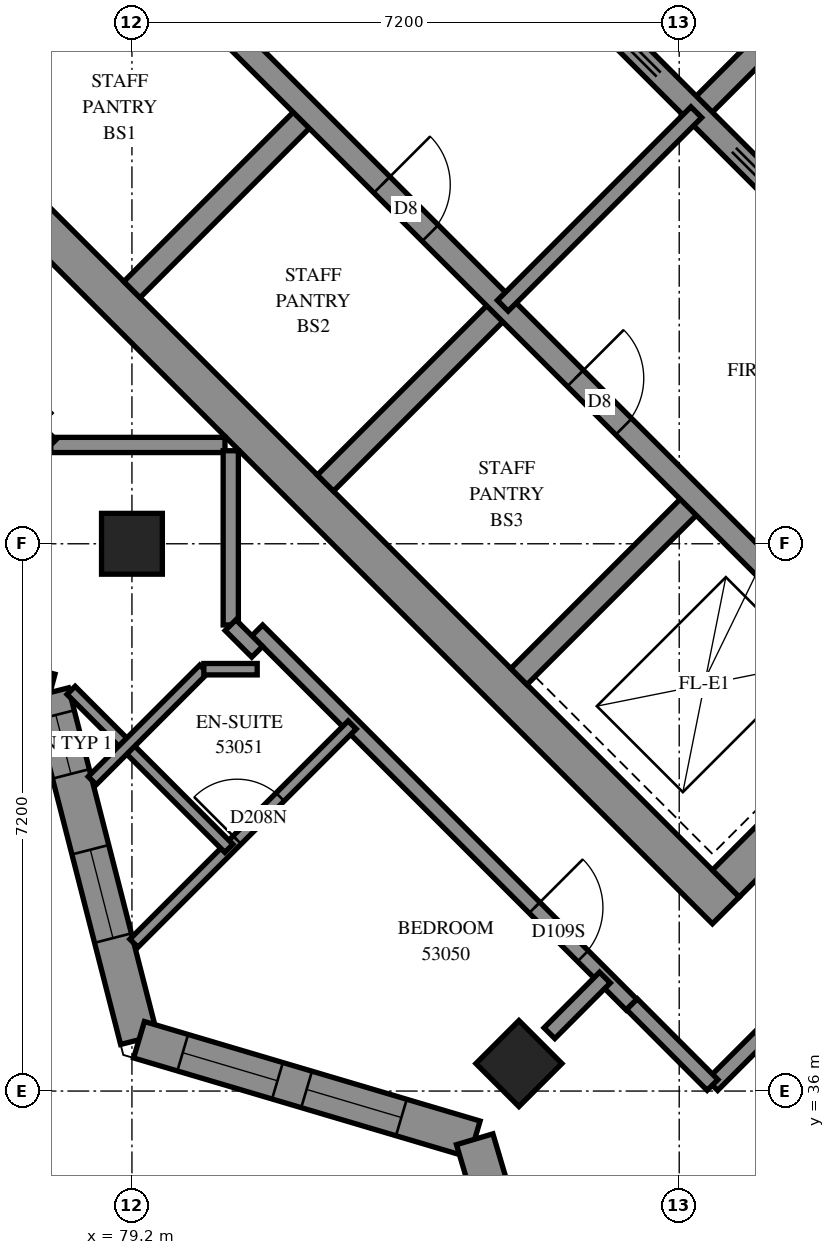
"""IFC4 building model, lengths in metres.
Left out: names, types, materials, properties, quantities, classifications, styles, units other than length and angle.
Written with IfcOpenShell. Run it as: python <this file> out.ifc"""

import sys

from ifc_helpers import new_model, si_unit, direction, frame, frame_2d, origin, origin_2d, place, context, subcontext, project, spatial, polyline, rectangle, outline, extrude, element, fill, save


model = new_model("IFC4")
c1 = context("Model", 3, precision=1e-05, world=origin(), true_north=direction((0.0, 1.0)))
c2 = subcontext(c1, "Body", "Model", "MODEL_VIEW")
j1 = project(units=[si_unit("LENGTHUNIT", "METRE"), si_unit("PLANEANGLEUNIT", "RADIAN")], contexts=[c1])
p1 = place(None, origin())
s1 = spatial("IfcSite", under=j1, at=p1, CompositionType="ELEMENT")
p2 = place(p1, origin())
s2 = spatial("IfcBuilding", under=s1, at=p2, CompositionType="ELEMENT")
p3 = place(p2, frame((0.0, 0.0, 196.4)))
s3 = spatial("IfcBuildingStorey", under=s2, at=p3, CompositionType="ELEMENT", Elevation=196.4)
for number, where, z_axis, x_axis in (
    (1, (79.2, 43.2, 0.0), (0.0, 0.0, 1.0), (1.0, 0.0, 0.0)),
    (2, (84.291, 36.362, 0.0), (0.0, 0.0, 1.0), (0.707, -0.707, 0.0)),
):
    element("IfcColumn", number, at=place(p3, frame(where, z_axis=z_axis, x_axis=x_axis)), inside=s3, PredefinedType="COLUMN", context=c2, shape_type="SweptSolid", body=[
        extrude(rectangle(XDim=0.8, YDim=0.8, at=origin_2d()), origin(), (0.0, 0.0, 1.0), 3.1),
    ])
p4 = place(p3, frame((76.124, 49.267, -0.3), z_axis=(0.0, 0.0, 1.0), x_axis=(0.7071067812, -0.7071067812, 0.0)))
e3 = element("IfcWall", 3, at=p4, inside=s3, PredefinedType="SHEAR", context=c2, shape_type="SweptSolid", body=[
    extrude(rectangle(XDim=15.4, YDim=0.5, at=frame_2d((7.7, 0.0))), origin(), (0.0, 0.0, 1.0), 2.7),
])
p5 = place(p3, frame((86.66, 59.802, -0.3), z_axis=(0.0, 0.0, 1.0), x_axis=(0.7071067812, -0.7071067812, 0.0)))
e4 = element("IfcWall", 4, at=p5, inside=s3, PredefinedType="SHEAR", context=c2, shape_type="SweptSolid", body=[
    extrude(rectangle(XDim=15.4, YDim=0.5, at=frame_2d((7.7, 0.0))), origin(), (0.0, 0.0, 1.0), 2.7),
])
p6 = place(p5, frame((10.5, 0.0, 0.3)))
e5 = element("IfcOpeningElement", 5, at=p6, cuts=e4, PredefinedType="OPENING", context=c2, shape_type="SweptSolid", body=[
    extrude(rectangle(XDim=0.8, YDim=2.1, at=frame_2d((0.4, 1.05))), frame((0.0, 0.26, 0.0), z_axis=(0.0, -1.0, 0.0), x_axis=(1.0, 0.0, 0.0)), (0.0, 0.0, 1.0), 0.52),
])
p7 = place(p3, frame((76.478, 49.267, -0.3), z_axis=(0.0, 0.0, 1.0), x_axis=(0.7071067812, 0.7071067812, 0.0)))
e6 = element("IfcWall", 6, at=p7, inside=s3, PredefinedType="SHEAR", context=c2, shape_type="SweptSolid", body=[
    extrude(rectangle(XDim=14.4, YDim=0.5, at=frame_2d((7.2, 0.0))), origin(), (0.0, 0.0, 1.0), 2.7),
])
p8 = place(p7, frame((4.55, 0.0, 0.3)))
e7 = element("IfcOpeningElement", 7, at=p8, cuts=e6, PredefinedType="OPENING", context=c2, shape_type="SweptSolid", body=[
    extrude(rectangle(XDim=1.1, YDim=2.1, at=frame_2d((0.55, 1.05))), frame((0.0, 0.26, 0.0), z_axis=(0.0, -1.0, 0.0), x_axis=(1.0, 0.0, 0.0)), (0.0, 0.0, 1.0), 0.52),
])
p9 = place(p7, frame((11.35, 0.0, 0.3)))
e8 = element("IfcOpeningElement", 8, at=p9, cuts=e6, PredefinedType="OPENING", context=c2, shape_type="SweptSolid", body=[
    extrude(rectangle(XDim=1.1, YDim=2.1, at=frame_2d((0.55, 1.05))), frame((0.0, 0.26, 0.0), z_axis=(0.0, -1.0, 0.0), x_axis=(1.0, 0.0, 0.0)), (0.0, 0.0, 1.0), 0.52),
])
p10 = place(p3, frame((87.013, 38.731, -0.3), z_axis=(0.0, 0.0, 1.0), x_axis=(0.7071067812, 0.7071067812, 0.0)))
e9 = element("IfcWall", 9, at=p10, inside=s3, PredefinedType="SHEAR", context=c2, shape_type="SweptSolid", body=[
    extrude(rectangle(XDim=14.4, YDim=0.5, at=frame_2d((7.2, 0.0))), origin(), (0.0, 0.0, 1.0), 2.7),
])
p11 = place(p10, frame((4.55, 0.0, 0.3)))
e10 = element("IfcOpeningElement", 10, at=p11, cuts=e9, PredefinedType="OPENING", context=c2, shape_type="SweptSolid", body=[
    extrude(rectangle(XDim=1.1, YDim=2.1, at=frame_2d((0.55, 1.05))), frame((0.0, 0.26, 0.0), z_axis=(0.0, -1.0, 0.0), x_axis=(1.0, 0.0, 0.0)), (0.0, 0.0, 1.0), 0.52),
])
p12 = place(p10, frame((11.35, 0.0, 0.3)))
e11 = element("IfcOpeningElement", 11, at=p12, cuts=e9, PredefinedType="OPENING", context=c2, shape_type="SweptSolid", body=[
    extrude(rectangle(XDim=1.1, YDim=2.1, at=frame_2d((0.55, 1.05))), frame((0.0, 0.26, 0.0), z_axis=(0.0, -1.0, 0.0), x_axis=(1.0, 0.0, 0.0)), (0.0, 0.0, 1.0), 0.52),
])
p13 = place(p3, frame((79.2, 46.544, 0.0), z_axis=(0.0, 0.0, 1.0), x_axis=(0.7071219326, 0.7070916295, 0.0)))
e12 = element("IfcWall", 12, at=p13, inside=s3, PredefinedType="SOLIDWALL", context=c2, shape_type="SweptSolid", body=[
    extrude(rectangle(XDim=3.3, YDim=0.3, at=frame_2d((1.65, 0.0))), origin(), (0.0, 0.0, 1.0), 3.1),
])
p14 = place(p3, frame((81.746, 43.999, 0.0), z_axis=(0.0, 0.0, 1.0), x_axis=(0.7071067812, 0.7071067812, 0.0)))
e13 = element("IfcWall", 13, at=p14, inside=s3, PredefinedType="SOLIDWALL", context=c2, shape_type="SweptSolid", body=[
    extrude(rectangle(XDim=3.3, YDim=0.3, at=frame_2d((1.65, 0.0))), origin(), (0.0, 0.0, 1.0), 3.1),
])
p15 = place(p3, frame((86.625, 48.878, 0.0), z_axis=(0.0, 0.0, 1.0), x_axis=(0.7071067812, 0.7071067812, 0.0)))
e14 = element("IfcWall", 14, at=p15, inside=s3, PredefinedType="SOLIDWALL", context=c2, shape_type="SweptSolid", body=[
    extrude(rectangle(XDim=3.3, YDim=0.3, at=frame_2d((1.65, 0.0))), origin(), (0.0, 0.0, 1.0), 3.1),
])
p16 = place(p3, frame((84.291, 41.453, 0.0), z_axis=(0.0, 0.0, 1.0), x_axis=(0.7071067812, 0.7071067812, 0.0)))
e15 = element("IfcWall", 15, at=p16, inside=s3, PredefinedType="SOLIDWALL", context=c2, shape_type="SweptSolid", body=[
    extrude(rectangle(XDim=3.3, YDim=0.3, at=frame_2d((1.65, 0.0))), origin(), (0.0, 0.0, 1.0), 3.1),
])
p17 = place(p3, frame((78.988, 51.423, 0.0), z_axis=(0.0, 0.0, 1.0), x_axis=(0.7071067812, -0.7071067812, 0.0)))
e16 = element("IfcWall", 16, at=p17, inside=s3, PredefinedType="SOLIDWALL", context=c2, shape_type="SweptSolid", body=[
    extrude(rectangle(XDim=14.4, YDim=0.3, at=frame_2d((7.2, 0.0))), origin(), (0.0, 0.0, 1.0), 3.1),
])
p18 = place(p17, frame((1.35, 0.0, 0.0)))
e17 = element("IfcOpeningElement", 17, at=p18, cuts=e16, PredefinedType="OPENING", context=c2, shape_type="SweptSolid", body=[
    extrude(rectangle(XDim=0.9, YDim=2.1, at=frame_2d((0.45, 1.05))), frame((0.0, 0.16, 0.0), z_axis=(0.0, -1.0, 0.0), x_axis=(1.0, 0.0, 0.0)), (0.0, 0.0, 1.0), 0.32),
])
p19 = place(p17, frame((4.95, 0.0, 0.0)))
e18 = element("IfcOpeningElement", 18, at=p19, cuts=e16, PredefinedType="OPENING", context=c2, shape_type="SweptSolid", body=[
    extrude(rectangle(XDim=0.9, YDim=2.1, at=frame_2d((0.45, 1.05))), frame((0.0, 0.16, 0.0), z_axis=(0.0, -1.0, 0.0), x_axis=(1.0, 0.0, 0.0)), (0.0, 0.0, 1.0), 0.32),
])
p20 = place(p17, frame((8.55, 0.0, 0.0)))
e19 = element("IfcOpeningElement", 19, at=p20, cuts=e16, PredefinedType="OPENING", context=c2, shape_type="SweptSolid", body=[
    extrude(rectangle(XDim=0.9, YDim=2.1, at=frame_2d((0.45, 1.05))), frame((0.0, 0.16, 0.0), z_axis=(0.0, -1.0, 0.0), x_axis=(1.0, 0.0, 0.0)), (0.0, 0.0, 1.0), 0.32),
])
p21 = place(p17, frame((12.05, 0.0, 0.0)))
e20 = element("IfcOpeningElement", 20, at=p21, cuts=e16, PredefinedType="OPENING", context=c2, shape_type="SweptSolid", body=[
    extrude(rectangle(XDim=1.1, YDim=2.1, at=frame_2d((0.55, 1.05))), frame((0.0, 0.16, 0.0), z_axis=(0.0, -1.0, 0.0), x_axis=(1.0, 0.0, 0.0)), (0.0, 0.0, 1.0), 0.32),
])
p22 = place(p3, frame((81.534, 53.969, 0.0), z_axis=(0.0, 0.0, 1.0), x_axis=(0.707103309, -0.7071102534, 0.0)))
e21 = element("IfcWall", 21, at=p22, inside=s3, PredefinedType="SOLIDWALL", context=c2, shape_type="SweptSolid", body=[
    extrude(rectangle(XDim=14.4, YDim=0.3, at=frame_2d((7.2, 0.0))), origin(), (0.0, 0.0, 1.0), 3.1),
])
p23 = place(p22, frame((1.25, 0.0, 0.0)))
e22 = element("IfcOpeningElement", 22, at=p23, cuts=e21, PredefinedType="OPENING", context=c2, shape_type="SweptSolid", body=[
    extrude(rectangle(XDim=1.1, YDim=2.1, at=frame_2d((0.55, 1.05))), frame((0.0, 0.16, 0.0), z_axis=(0.0, -1.0, 0.0), x_axis=(1.0, 0.0, 0.0)), (0.0, 0.0, 1.0), 0.32),
])
p24 = place(p22, frame((4.85, 0.0, 0.0)))
e23 = element("IfcOpeningElement", 23, at=p24, cuts=e21, PredefinedType="OPENING", context=c2, shape_type="SweptSolid", body=[
    extrude(rectangle(XDim=1.1, YDim=2.1, at=frame_2d((0.55, 1.05))), frame((0.0, 0.16, 0.0), z_axis=(0.0, -1.0, 0.0), x_axis=(1.0, 0.0, 0.0)), (0.0, 0.0, 1.0), 0.32),
])
p25 = place(p22, frame((8.45, 0.0, 0.0)))
e24 = element("IfcOpeningElement", 24, at=p25, cuts=e21, PredefinedType="OPENING", context=c2, shape_type="SweptSolid", body=[
    extrude(rectangle(XDim=1.1, YDim=2.1, at=frame_2d((0.55, 1.05))), frame((0.0, 0.16, 0.0), z_axis=(0.0, -1.0, 0.0), x_axis=(1.0, 0.0, 0.0)), (0.0, 0.0, 1.0), 0.32),
])
p26 = place(p22, frame((12.05, 0.0, 0.0)))
e25 = element("IfcOpeningElement", 25, at=p26, cuts=e21, PredefinedType="OPENING", context=c2, shape_type="SweptSolid", body=[
    extrude(rectangle(XDim=1.1, YDim=2.1, at=frame_2d((0.55, 1.05))), frame((0.0, 0.16, 0.0), z_axis=(0.0, -1.0, 0.0), x_axis=(1.0, 0.0, 0.0)), (0.0, 0.0, 1.0), 0.32),
])
p27 = place(p3, frame((74.348, 42.253, 0.0), z_axis=(0.0, 0.0, 1.0), x_axis=(0.9659839018, -0.2586022069, 0.0)))
e26 = element("IfcWall", 26, at=p27, inside=s3, PredefinedType="SOLIDWALL", context=c2, shape_type="SweptSolid", body=[
    extrude(outline(polyline([(0.046, -0.25), (3.762, -0.25), (4.054, 0.25), (-0.046, 0.25), (0.046, -0.25)])), origin(), (0.0, 0.0, 1.0), 3.1),
])
p28 = place(p27, frame((1.902, 0.0, 0.45)))
e27 = element("IfcOpeningElement", 27, at=p28, cuts=e26, PredefinedType="OPENING", context=c2, shape_type="SweptSolid", body=[
    extrude(rectangle(XDim=1.2, YDim=2.5, at=frame_2d((0.6, 1.25))), frame((0.0, 0.26, 0.0), z_axis=(0.0, -1.0, 0.0), x_axis=(1.0, 0.0, 0.0)), (0.0, 0.0, 1.0), 0.52),
])
p29 = place(p3, frame((78.123, 41.243, 0.0), z_axis=(0.0, 0.0, 1.0), x_axis=(0.2482151311, -0.9687049338, 0.0)))
e28 = element("IfcWall", 28, at=p29, inside=s3, PredefinedType="SOLIDWALL", context=c2, shape_type="SweptSolid", body=[
    extrude(outline(polyline([(0.146, -0.25), (4.857, -0.25), (4.574, 0.25), (-0.146, 0.25), (0.146, -0.25)])), origin(), (0.0, 0.0, 1.0), 3.1),
])
p30 = place(p29, frame((2.135, 0.0, 0.45)))
e29 = element("IfcOpeningElement", 29, at=p30, cuts=e28, PredefinedType="OPENING", context=c2, shape_type="SweptSolid", body=[
    extrude(rectangle(XDim=1.2, YDim=2.5, at=frame_2d((0.6, 1.25))), frame((0.0, 0.26, 0.0), z_axis=(0.0, -1.0, 0.0), x_axis=(1.0, 0.0, 0.0)), (0.0, 0.0, 1.0), 0.52),
])
p31 = place(p29, frame((0.305, 0.0, 0.45)))
e30 = element("IfcOpeningElement", 30, at=p31, cuts=e28, PredefinedType="OPENING", context=c2, shape_type="SweptSolid", body=[
    extrude(rectangle(XDim=0.8, YDim=2.5, at=frame_2d((0.4, 1.25))), frame((0.0, 0.26, 0.0), z_axis=(0.0, -1.0, 0.0), x_axis=(1.0, 0.0, 0.0)), (0.0, 0.0, 1.0), 0.52),
])
p32 = place(p3, frame((79.293, 36.675, 0.0), z_axis=(0.0, 0.0, 1.0), x_axis=(0.9587670056, -0.2841932951, 0.0)))
e31 = element("IfcWall", 31, at=p32, inside=s3, PredefinedType="SOLIDWALL", context=c2, shape_type="SweptSolid", body=[
    extrude(outline(polyline([(-0.142, -0.25), (4.47, -0.25), (4.742, 0.25), (0.142, 0.25), (-0.142, -0.25)])), origin(), (0.0, 0.0, 1.0), 3.1),
])
p33 = place(p32, frame((0.6, 0.0, 0.45)))
e32 = element("IfcOpeningElement", 32, at=p33, cuts=e31, PredefinedType="OPENING", context=c2, shape_type="SweptSolid", body=[
    extrude(rectangle(XDim=1.3, YDim=2.5, at=frame_2d((0.65, 1.25))), frame((0.0, 0.26, 0.0), z_axis=(0.0, -1.0, 0.0), x_axis=(1.0, 0.0, 0.0)), (0.0, 0.0, 1.0), 0.52),
])
p34 = place(p32, frame((2.3, 0.0, 0.45)))
e33 = element("IfcOpeningElement", 33, at=p34, cuts=e31, PredefinedType="OPENING", context=c2, shape_type="SweptSolid", body=[
    extrude(rectangle(XDim=1.3, YDim=2.5, at=frame_2d((0.65, 1.25))), frame((0.0, 0.26, 0.0), z_axis=(0.0, -1.0, 0.0), x_axis=(1.0, 0.0, 0.0)), (0.0, 0.0, 1.0), 0.52),
])
p35 = place(p3, frame((83.709, 35.366, 0.0), z_axis=(0.0, 0.0, 1.0), x_axis=(0.2841932951, -0.9587670056, 0.0)))
e34 = element("IfcWall", 34, at=p35, inside=s3, PredefinedType="SOLIDWALL", context=c2, shape_type="SweptSolid", body=[
    extrude(outline(polyline([(0.136, -0.25), (4.748, -0.25), (4.464, 0.25), (-0.136, 0.25), (0.136, -0.25)])), origin(), (0.0, 0.0, 1.0), 3.1),
])
p36 = place(p35, frame((1.047, 0.0, 0.45)))
e35 = element("IfcOpeningElement", 35, at=p36, cuts=e34, PredefinedType="OPENING", context=c2, shape_type="SweptSolid", body=[
    extrude(rectangle(XDim=1.2, YDim=2.5, at=frame_2d((0.6, 1.25))), frame((0.0, 0.26, 0.0), z_axis=(0.0, -1.0, 0.0), x_axis=(1.0, 0.0, 0.0)), (0.0, 0.0, 1.0), 0.52),
])
p37 = place(p3, frame((84.079, 46.332, 0.0), z_axis=(0.0, 0.0, 1.0), x_axis=(0.7071067812, 0.7071067812, 0.0)))
e36 = element("IfcWall", 36, at=p37, inside=s3, PredefinedType="PARTITIONING", context=c2, shape_type="SweptSolid", body=[
    extrude(rectangle(XDim=3.6, YDim=0.2, at=frame_2d((1.8, 0.0))), origin(), (0.0, 0.0, 1.0), 3.1),
])
p38 = place(p3, frame((84.981, 31.956, 0.0), z_axis=(0.0, 0.0, 1.0), x_axis=(0.7072314232, 0.7069821172, 0.0)))
e37 = element("IfcWall", 37, at=p38, inside=s3, PredefinedType="PARTITIONING", context=c2, shape_type="SweptSolid", body=[
    extrude(rectangle(XDim=10.028, YDim=0.2, at=frame_2d((5.014, 0.0))), origin(), (0.0, 0.0, 1.0), 3.1),
])
p39 = place(p3, frame((86.835, 36.079, 0.0), z_axis=(0.0, 0.0, 1.0), x_axis=(0.7071067812, 0.7071067812, 0.0)))
e38 = element("IfcWall", 38, at=p39, inside=s3, PredefinedType="PARTITIONING", context=c2, shape_type="SweptSolid", body=[
    extrude(rectangle(XDim=8.2, YDim=0.2, at=frame_2d((4.1, 0.0))), origin(), (0.0, 0.0, 1.0), 3.1),
])
p40 = place(p3, frame((80.849, 42.061, 0.0), z_axis=(0.0, 0.0, 1.0), x_axis=(0.7071067812, -0.7071067812, 0.0)))
e39 = element("IfcWall", 39, at=p40, inside=s3, PredefinedType="PARTITIONING", context=c2, shape_type="SweptSolid", body=[
    extrude(rectangle(XDim=6.964, YDim=0.2, at=frame_2d((3.482, 0.0))), origin(), (0.0, 0.0, 1.0), 3.1),
])
p41 = place(p40, frame((5.159, 0.0, 0.0)))
e40 = element("IfcOpeningElement", 40, at=p41, cuts=e39, PredefinedType="OPENING", context=c2, shape_type="SweptSolid", body=[
    extrude(rectangle(XDim=0.9, YDim=2.1, at=frame_2d((0.45, 1.05))), frame((0.0, 0.11, 0.0), z_axis=(0.0, -1.0, 0.0), x_axis=(1.0, 0.0, 0.0)), (0.0, 0.0, 1.0), 0.22),
])
p42 = place(p3, frame((79.226, 37.945, 0.0), z_axis=(0.0, 0.0, 1.0), x_axis=(0.7071067812, 0.7071067812, 0.0)))
e41 = element("IfcWall", 41, at=p42, inside=s3, PredefinedType="PARTITIONING", context=c2, shape_type="SweptSolid", body=[
    extrude(rectangle(XDim=4.061, YDim=0.15, at=frame_2d((2.03, 0.0))), origin(), (0.0, 0.0, 1.0), 3.1),
])
p43 = place(p42, frame((1.921, 0.0, 0.0)))
e42 = element("IfcOpeningElement", 42, at=p43, cuts=e41, PredefinedType="OPENING", context=c2, shape_type="SweptSolid", body=[
    extrude(rectangle(XDim=0.8, YDim=2.1, at=frame_2d((0.4, 1.05))), frame((0.0, 0.085, 0.0), z_axis=(0.0, -1.0, 0.0), x_axis=(1.0, 0.0, 0.0)), (0.0, 0.0, 1.0), 0.17),
])
p44 = place(p3, frame((78.4, 41.272, 0.0), z_axis=(0.0, 0.0, 1.0), x_axis=(0.7065959276, -0.707617266, 0.0)))
e43 = element("IfcWall", 43, at=p44, inside=s3, PredefinedType="PARTITIONING", context=c2, shape_type="SweptSolid", body=[
    extrude(rectangle(XDim=2.937, YDim=0.15, at=frame_2d((1.469, 0.0))), origin(), (0.0, 0.0, 1.0), 3.1),
])
for number, where, z_axis, x_axis in (
    (44, (78.132, 44.5, 0.0), (0.0, 0.0, 1.0), (1.0, 0.0, 0.0)),
    (45, (80.5, 42.132, 0.0), (0.0, 0.0, 1.0), (0.0, 1.0, 0.0)),
):
    element("IfcWall", number, at=place(p3, frame(where, z_axis=z_axis, x_axis=x_axis)), inside=s3, PredefinedType="PARTITIONING", context=c2, shape_type="SweptSolid", body=[
        extrude(rectangle(XDim=2.292, YDim=0.2, at=frame_2d((1.146, 0.0))), origin(), (0.0, 0.0, 1.0), 3.1),
    ])
p45 = place(p3, frame((78.678, 40.084, 0.0), z_axis=(0.0, 0.0, 1.0), x_axis=(0.7070826828, 0.7071308787, 0.0)))
e46 = element("IfcWall", 46, at=p45, inside=s3, PredefinedType="PARTITIONING", context=c2, shape_type="SweptSolid", body=[
    extrude(rectangle(XDim=2.075, YDim=0.15, at=frame_2d((1.037, 0.0))), origin(), (0.0, 0.0, 1.0), 3.1),
])
p46 = place(p3, frame((85.778, 37.142, 0.0), z_axis=(0.0, 0.0, 1.0), x_axis=(0.7064400143, -0.70777292, 0.0)))
e47 = element("IfcWall", 47, at=p46, inside=s3, PredefinedType="PARTITIONING", context=c2, shape_type="SweptSolid", body=[
    extrude(rectangle(XDim=1.5, YDim=0.2, at=frame_2d((0.75, 0.0))), origin(), (0.0, 0.0, 1.0), 3.1),
])
p47 = place(p3, frame((84.693, 36.761, 0.0), z_axis=(0.0, 0.0, 1.0), x_axis=(0.7061388061, 0.708073433, 0.0)))
e48 = element("IfcWall", 48, at=p47, inside=s3, PredefinedType="PARTITIONING", context=c2, shape_type="SweptSolid", body=[
    extrude(rectangle(XDim=1.034, YDim=0.2, at=frame_2d((0.517, 0.0))), origin(), (0.0, 0.0, 1.0), 3.1),
])
p48 = place(p3, frame((80.146, 41.55, 0.0), z_axis=(0.0, 0.0, 1.0), x_axis=(1.0, 0.0, 0.0)))
e49 = element("IfcWall", 49, at=p48, inside=s3, PredefinedType="PARTITIONING", context=c2, shape_type="SweptSolid", body=[
    extrude(rectangle(XDim=0.702, YDim=0.15, at=frame_2d((0.351, 0.0))), origin(), (0.0, 0.0, 1.0), 3.1),
])
for number, where, z_axis, x_axis in (
    (50, (77.779, 44.847, 0.0), (0.0, 0.0, 1.0), (0.707, -0.707, 0.0)),
    (51, (80.497, 42.129, 0.0), (0.0, 0.0, 1.0), (0.707, -0.707, 0.0)),
):
    element("IfcWall", number, at=place(p3, frame(where, z_axis=z_axis, x_axis=x_axis)), inside=s3, PredefinedType="PARTITIONING", context=c2, shape_type="SweptSolid", body=[
        extrude(rectangle(XDim=0.495, YDim=0.2, at=frame_2d((0.247, 0.0))), origin(), (0.0, 0.0, 1.0), 3.1),
    ])
p49 = place(p30, origin())
e52 = element("IfcWindow", 52, at=p49, inside=s3, PartitioningType="SINGLE_PANEL", PredefinedType="WINDOW", context=c2, shape_type="SweptSolid", body=[
    extrude(rectangle(XDim=1.2, YDim=2.5, at=frame_2d((0.6, 1.25))), frame((0.0, 0.18, 0.0), z_axis=(0.0, -1.0, 0.0), x_axis=(1.0, 0.0, 0.0)), (0.0, 0.0, 1.0), 0.06),
])
fill(e29, e52)
p50 = place(p33, origin())
e53 = element("IfcWindow", 53, at=p50, inside=s3, PartitioningType="SINGLE_PANEL", PredefinedType="WINDOW", context=c2, shape_type="SweptSolid", body=[
    extrude(rectangle(XDim=1.3, YDim=2.5, at=frame_2d((0.65, 1.25))), frame((0.0, 0.18, 0.0), z_axis=(0.0, -1.0, 0.0), x_axis=(1.0, 0.0, 0.0)), (0.0, 0.0, 1.0), 0.06),
])
fill(e32, e53)
p51 = place(p34, origin())
e54 = element("IfcWindow", 54, at=p51, inside=s3, PartitioningType="SINGLE_PANEL", PredefinedType="WINDOW", context=c2, shape_type="SweptSolid", body=[
    extrude(rectangle(XDim=1.3, YDim=2.5, at=frame_2d((0.65, 1.25))), frame((0.0, 0.18, 0.0), z_axis=(0.0, -1.0, 0.0), x_axis=(1.0, 0.0, 0.0)), (0.0, 0.0, 1.0), 0.06),
])
fill(e33, e54)
p52 = place(p19, origin())
e55 = element("IfcDoor", 55, at=p52, inside=s3, OperationType="SINGLE_SWING_LEFT", PredefinedType="DOOR", context=c2, shape_type="SweptSolid", body=[
    extrude(rectangle(XDim=0.9, YDim=2.1, at=frame_2d((0.45, 1.05))), frame((0.0, 0.025, 0.0), z_axis=(0.0, -1.0, 0.0), x_axis=(1.0, 0.0, 0.0)), (0.0, 0.0, 1.0), 0.05),
])
fill(e18, e55)
p53 = place(p20, origin())
e56 = element("IfcDoor", 56, at=p53, inside=s3, OperationType="SINGLE_SWING_LEFT", PredefinedType="DOOR", context=c2, shape_type="SweptSolid", body=[
    extrude(rectangle(XDim=0.9, YDim=2.1, at=frame_2d((0.45, 1.05))), frame((0.0, 0.025, 0.0), z_axis=(0.0, -1.0, 0.0), x_axis=(1.0, 0.0, 0.0)), (0.0, 0.0, 1.0), 0.05),
])
fill(e19, e56)
p54 = place(p41, origin())
e57 = element("IfcDoor", 57, at=p54, inside=s3, OperationType="SINGLE_SWING_RIGHT", PredefinedType="DOOR", context=c2, shape_type="SweptSolid", body=[
    extrude(rectangle(XDim=0.9, YDim=2.1, at=frame_2d((0.45, 1.05))), frame((0.0, 0.025, 0.0), z_axis=(0.0, -1.0, 0.0), x_axis=(1.0, 0.0, 0.0)), (0.0, 0.0, 1.0), 0.05),
])
fill(e40, e57)
p55 = place(p43, origin())
e58 = element("IfcDoor", 58, at=p55, inside=s3, OperationType="SINGLE_SWING_RIGHT", PredefinedType="DOOR", context=c2, shape_type="SweptSolid", body=[
    extrude(rectangle(XDim=0.8, YDim=2.1, at=frame_2d((0.4, 1.05))), frame((0.0, 0.025, 0.0), z_axis=(0.0, -1.0, 0.0), x_axis=(1.0, 0.0, 0.0)), (0.0, 0.0, 1.0), 0.05),
])
fill(e42, e58)
p56 = place(p31, origin())
e59 = element("IfcWindow", 59, at=p56, inside=s3, PartitioningType="SINGLE_PANEL", PredefinedType="WINDOW", context=c2, shape_type="SweptSolid", body=[
    extrude(rectangle(XDim=0.8, YDim=2.5, at=frame_2d((0.4, 1.25))), frame((0.0, 0.18, 0.0), z_axis=(0.0, -1.0, 0.0), x_axis=(1.0, 0.0, 0.0)), (0.0, 0.0, 1.0), 0.06),
])
fill(e30, e59)
save(model, sys.argv[1])
